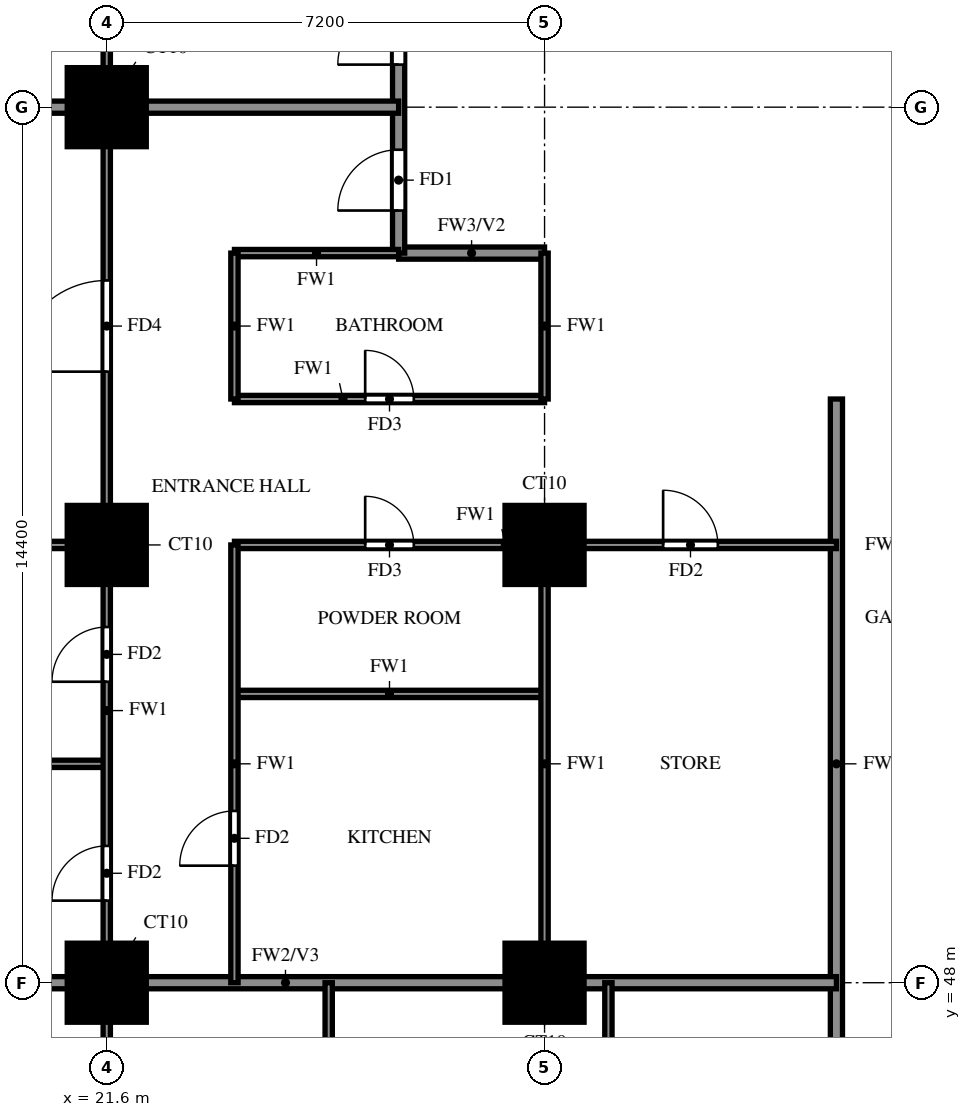
"""IFC4 building model, lengths in metres.
Left out: names, types, materials, properties, quantities, classifications, styles, units other than length and angle.
Written with IfcOpenShell. Run it as: python <this file> out.ifc"""

import sys

from ifc_helpers import new_model, si_unit, direction, frame, frame_2d, origin, origin_2d, place, context, subcontext, project, spatial, rectangle, extrude, source, transform, mapped, element, fill, save


model = new_model("IFC4")
c1 = context("Model", 3, precision=1e-05, world=origin(), true_north=direction((0.0, 1.0)))
c2 = subcontext(c1, "Body", "Model", "MODEL_VIEW")
j1 = project(units=[si_unit("LENGTHUNIT", "METRE"), si_unit("PLANEANGLEUNIT", "RADIAN")], contexts=[c1])
p1 = place(None, origin())
s1 = spatial("IfcSite", under=j1, at=p1, CompositionType="ELEMENT")
p2 = place(p1, origin())
s2 = spatial("IfcBuilding", under=s1, at=p2, CompositionType="ELEMENT")
p3 = place(p2, frame((0.0, 0.0, 69.0)))
s3 = spatial("IfcBuildingStorey", under=s2, at=p3, CompositionType="ELEMENT", Elevation=69.0)
m1 = source(origin(), c2, "Body", "SweptSolid", [
    extrude(rectangle(XDim=1.3, YDim=1.3, at=origin_2d()), origin(), (0.0, 0.0, 1.0), 3.18),
])
for number, where, z_axis, x_axis in (
    (1, (21.6, 48.0, 0.0), (0.0, 0.0, 1.0), (1.0, 0.0, 0.0)),
    (2, (28.8, 48.0, 0.0), (0.0, 0.0, 1.0), (1.0, 0.0, 0.0)),
    (3, (21.6, 55.2, 0.0), (0.0, 0.0, 1.0), (1.0, 0.0, 0.0)),
    (4, (28.8, 55.2, 0.0), (0.0, 0.0, 1.0), (1.0, 0.0, 0.0)),
    (5, (21.6, 62.4, 0.0), (0.0, 0.0, 1.0), (1.0, 0.0, 0.0)),
):
    element("IfcColumn", number, at=place(p3, frame(where, z_axis=z_axis, x_axis=x_axis)), inside=s3, PredefinedType="COLUMN", context=c2, shape_type="MappedRepresentation", body=[
        mapped(m1, transform((0.0, 0.0, 0.0))),
    ])
p4 = place(p3, frame((26.4, 60.0, 0.0), z_axis=(0.0, 0.0, 1.0), x_axis=(1.0, 0.0, 0.0)))
e6 = element("IfcWall", 6, at=p4, inside=s3, PredefinedType="SOLIDWALL", context=c2, shape_type="SweptSolid", body=[
    extrude(rectangle(XDim=2.4, YDim=0.2, at=frame_2d((1.2, 0.0))), origin(), (0.0, 0.0, 1.0), 3.18),
])
p5 = place(p3, frame((26.4, 60.0, 0.0), z_axis=(0.0, 0.0, 1.0), x_axis=(0.0, 1.0, 0.0)))
e7 = element("IfcWall", 7, at=p5, inside=s3, PredefinedType="SOLIDWALL", context=c2, shape_type="SweptSolid", body=[
    extrude(rectangle(XDim=9.6, YDim=0.2, at=frame_2d((4.8, 0.0))), origin(), (0.0, 0.0, 1.0), 3.18),
])
p6 = place(p5, frame((0.7, 0.0, 0.0)))
e8 = element("IfcOpeningElement", 8, at=p6, cuts=e7, PredefinedType="OPENING", context=c2, shape_type="SweptSolid", body=[
    extrude(rectangle(XDim=1.0, YDim=2.1, at=frame_2d((0.5, 1.05))), frame((0.0, 0.11, 0.0), z_axis=(0.0, -1.0, 0.0), x_axis=(1.0, 0.0, 0.0)), (0.0, 0.0, 1.0), 0.22),
])
p7 = place(p5, frame((3.1, 0.0, 0.0)))
e9 = element("IfcOpeningElement", 9, at=p7, cuts=e7, PredefinedType="OPENING", context=c2, shape_type="SweptSolid", body=[
    extrude(rectangle(XDim=1.0, YDim=2.1, at=frame_2d((0.5, 1.05))), frame((0.0, 0.11, 0.0), z_axis=(0.0, -1.0, 0.0), x_axis=(1.0, 0.0, 0.0)), (0.0, 0.0, 1.0), 0.22),
])
p8 = place(p3, frame((33.6, 45.6, 0.0), z_axis=(0.0, 0.0, 1.0), x_axis=(0.0, 1.0, 0.0)))
e10 = element("IfcWall", 10, at=p8, inside=s3, PredefinedType="SOLIDWALL", context=c2, shape_type="SweptSolid", body=[
    extrude(rectangle(XDim=12.0, YDim=0.2, at=frame_2d((6.0, 0.0))), origin(), (0.0, 0.0, 1.0), 3.18),
])
p9 = place(p3, frame((14.525, 48.0, 0.0), z_axis=(0.0, 0.0, 1.0), x_axis=(1.0, 0.0, 0.0)))
e11 = element("IfcWall", 11, at=p9, inside=s3, PredefinedType="SOLIDWALL", context=c2, shape_type="SweptSolid", body=[
    extrude(rectangle(XDim=19.075, YDim=0.2, at=frame_2d((9.538, 0.0))), origin(), (0.0, 0.0, 1.0), 3.18),
])
p10 = place(p3, frame((14.525, 62.4, 0.0), z_axis=(0.0, 0.0, 1.0), x_axis=(1.0, 0.0, 0.0)))
e12 = element("IfcWall", 12, at=p10, inside=s3, PredefinedType="SOLIDWALL", context=c2, shape_type="SweptSolid", body=[
    extrude(rectangle(XDim=11.875, YDim=0.2, at=frame_2d((5.938, 0.0))), origin(), (0.0, 0.0, 1.0), 3.18),
])
p11 = place(p3, frame((14.525, 51.6, 0.0), z_axis=(0.0, 0.0, 1.0), x_axis=(1.0, 0.0, 0.0)))
e13 = element("IfcWall", 13, at=p11, inside=s3, PredefinedType="PARTITIONING", context=c2, shape_type="SweptSolid", body=[
    extrude(rectangle(XDim=7.075, YDim=0.12, at=frame_2d((3.538, 0.0))), origin(), (0.0, 0.0, 1.0), 2.28),
])
p12 = place(p3, frame((23.7, 52.75, 0.0), z_axis=(0.0, 0.0, 1.0), x_axis=(1.0, 0.0, 0.0)))
e14 = element("IfcWall", 14, at=p12, inside=s3, PredefinedType="PARTITIONING", context=c2, shape_type="SweptSolid", body=[
    extrude(rectangle(XDim=5.1, YDim=0.12, at=frame_2d((2.55, 0.0))), origin(), (0.0, 0.0, 1.0), 3.18),
])
p13 = place(p3, frame((14.525, 55.2, 0.0), z_axis=(0.0, 0.0, 1.0), x_axis=(1.0, 0.0, 0.0)))
e15 = element("IfcWall", 15, at=p13, inside=s3, PredefinedType="PARTITIONING", context=c2, shape_type="SweptSolid", body=[
    extrude(rectangle(XDim=7.075, YDim=0.12, at=frame_2d((3.538, 0.0))), origin(), (0.0, 0.0, 1.0), 3.18),
])
p14 = place(p3, frame((23.7, 55.2, 0.0), z_axis=(0.0, 0.0, 1.0), x_axis=(1.0, 0.0, 0.0)))
e16 = element("IfcWall", 16, at=p14, inside=s3, PredefinedType="PARTITIONING", context=c2, shape_type="SweptSolid", body=[
    extrude(rectangle(XDim=9.9, YDim=0.12, at=frame_2d((4.95, 0.0))), origin(), (0.0, 0.0, 1.0), 3.18),
])
p15 = place(p14, frame((2.15, 0.0, 0.0)))
e17 = element("IfcOpeningElement", 17, at=p15, cuts=e16, PredefinedType="OPENING", context=c2, shape_type="SweptSolid", body=[
    extrude(rectangle(XDim=0.8, YDim=2.1, at=frame_2d((0.4, 1.05))), frame((0.0, 0.07, 0.0), z_axis=(0.0, -1.0, 0.0), x_axis=(1.0, 0.0, 0.0)), (0.0, 0.0, 1.0), 0.14),
])
p16 = place(p14, frame((7.05, 0.0, 0.0)))
e18 = element("IfcOpeningElement", 18, at=p16, cuts=e16, PredefinedType="OPENING", context=c2, shape_type="SweptSolid", body=[
    extrude(rectangle(XDim=0.9, YDim=2.1, at=frame_2d((0.45, 1.05))), frame((0.0, 0.07, 0.0), z_axis=(0.0, -1.0, 0.0), x_axis=(1.0, 0.0, 0.0)), (0.0, 0.0, 1.0), 0.14),
])
p17 = place(p3, frame((23.7, 57.6, 0.0), z_axis=(0.0, 0.0, 1.0), x_axis=(1.0, 0.0, 0.0)))
e19 = element("IfcWall", 19, at=p17, inside=s3, PredefinedType="PARTITIONING", context=c2, shape_type="SweptSolid", body=[
    extrude(rectangle(XDim=5.1, YDim=0.12, at=frame_2d((2.55, 0.0))), origin(), (0.0, 0.0, 1.0), 3.18),
])
p18 = place(p17, frame((2.15, 0.0, 0.0)))
e20 = element("IfcOpeningElement", 20, at=p18, cuts=e19, PredefinedType="OPENING", context=c2, shape_type="SweptSolid", body=[
    extrude(rectangle(XDim=0.8, YDim=2.1, at=frame_2d((0.4, 1.05))), frame((0.0, 0.07, 0.0), z_axis=(0.0, -1.0, 0.0), x_axis=(1.0, 0.0, 0.0)), (0.0, 0.0, 1.0), 0.14),
])
p19 = place(p3, frame((23.7, 60.0, 0.0), z_axis=(0.0, 0.0, 1.0), x_axis=(1.0, 0.0, 0.0)))
e21 = element("IfcWall", 21, at=p19, inside=s3, PredefinedType="PARTITIONING", context=c2, shape_type="SweptSolid", body=[
    extrude(rectangle(XDim=2.7, YDim=0.12, at=frame_2d((1.35, 0.0))), origin(), (0.0, 0.0, 1.0), 3.18),
])
p20 = place(p3, frame((21.6, 33.725, 0.0), z_axis=(0.0, 0.0, 1.0), x_axis=(0.0, 1.0, 0.0)))
e22 = element("IfcWall", 22, at=p20, inside=s3, PredefinedType="PARTITIONING", context=c2, shape_type="SweptSolid", body=[
    extrude(rectangle(XDim=39.475, YDim=0.12, at=frame_2d((19.737, 0.0))), origin(), (0.0, 0.0, 1.0), 3.18),
])
p21 = place(p20, frame((7.775, 0.0, 0.0)))
e23 = element("IfcOpeningElement", 23, at=p21, cuts=e22, PredefinedType="OPENING", context=c2, shape_type="SweptSolid", body=[
    extrude(rectangle(XDim=0.9, YDim=2.1, at=frame_2d((0.45, 1.05))), frame((0.0, 0.07, 0.0), z_axis=(0.0, -1.0, 0.0), x_axis=(1.0, 0.0, 0.0)), (0.0, 0.0, 1.0), 0.14),
])
p22 = place(p20, frame((15.625, 0.0, 0.0)))
e24 = element("IfcOpeningElement", 24, at=p22, cuts=e22, PredefinedType="OPENING", context=c2, shape_type="SweptSolid", body=[
    extrude(rectangle(XDim=0.9, YDim=2.1, at=frame_2d((0.45, 1.05))), frame((0.0, 0.07, 0.0), z_axis=(0.0, -1.0, 0.0), x_axis=(1.0, 0.0, 0.0)), (0.0, 0.0, 1.0), 0.14),
])
p23 = place(p20, frame((19.225, 0.0, 0.0)))
e25 = element("IfcOpeningElement", 25, at=p23, cuts=e22, PredefinedType="OPENING", context=c2, shape_type="SweptSolid", body=[
    extrude(rectangle(XDim=0.9, YDim=2.1, at=frame_2d((0.45, 1.05))), frame((0.0, 0.07, 0.0), z_axis=(0.0, -1.0, 0.0), x_axis=(1.0, 0.0, 0.0)), (0.0, 0.0, 1.0), 0.14),
])
p24 = place(p20, frame((24.325, 0.0, 0.0)))
e26 = element("IfcOpeningElement", 26, at=p24, cuts=e22, PredefinedType="OPENING", context=c2, shape_type="SweptSolid", body=[
    extrude(rectangle(XDim=1.5, YDim=2.1, at=frame_2d((0.75, 1.05))), frame((0.0, 0.07, 0.0), z_axis=(0.0, -1.0, 0.0), x_axis=(1.0, 0.0, 0.0)), (0.0, 0.0, 1.0), 0.14),
])
p25 = place(p20, frame((30.025, 0.0, 0.0)))
e27 = element("IfcOpeningElement", 27, at=p25, cuts=e22, PredefinedType="OPENING", context=c2, shape_type="SweptSolid", body=[
    extrude(rectangle(XDim=0.9, YDim=2.1, at=frame_2d((0.45, 1.05))), frame((0.0, 0.07, 0.0), z_axis=(0.0, -1.0, 0.0), x_axis=(1.0, 0.0, 0.0)), (0.0, 0.0, 1.0), 0.14),
])
p26 = place(p20, frame((33.625, 0.0, 0.0)))
e28 = element("IfcOpeningElement", 28, at=p26, cuts=e22, PredefinedType="OPENING", context=c2, shape_type="SweptSolid", body=[
    extrude(rectangle(XDim=0.9, YDim=2.1, at=frame_2d((0.45, 1.05))), frame((0.0, 0.07, 0.0), z_axis=(0.0, -1.0, 0.0), x_axis=(1.0, 0.0, 0.0)), (0.0, 0.0, 1.0), 0.14),
])
p27 = place(p20, frame((37.225, 0.0, 0.0)))
e29 = element("IfcOpeningElement", 29, at=p27, cuts=e22, PredefinedType="OPENING", context=c2, shape_type="SweptSolid", body=[
    extrude(rectangle(XDim=0.9, YDim=2.1, at=frame_2d((0.45, 1.05))), frame((0.0, 0.07, 0.0), z_axis=(0.0, -1.0, 0.0), x_axis=(1.0, 0.0, 0.0)), (0.0, 0.0, 1.0), 0.14),
])
p28 = place(p3, frame((23.7, 48.0, 0.0), z_axis=(0.0, 0.0, 1.0), x_axis=(0.0, 1.0, 0.0)))
e30 = element("IfcWall", 30, at=p28, inside=s3, PredefinedType="PARTITIONING", context=c2, shape_type="SweptSolid", body=[
    extrude(rectangle(XDim=7.2, YDim=0.12, at=frame_2d((3.6, 0.0))), origin(), (0.0, 0.0, 1.0), 3.18),
])
p29 = place(p28, frame((1.925, 0.0, 0.0)))
e31 = element("IfcOpeningElement", 31, at=p29, cuts=e30, PredefinedType="OPENING", context=c2, shape_type="SweptSolid", body=[
    extrude(rectangle(XDim=0.9, YDim=2.1, at=frame_2d((0.45, 1.05))), frame((0.0, 0.07, 0.0), z_axis=(0.0, -1.0, 0.0), x_axis=(1.0, 0.0, 0.0)), (0.0, 0.0, 1.0), 0.14),
])
p30 = place(p3, frame((23.7, 57.6, 0.0), z_axis=(0.0, 0.0, 1.0), x_axis=(0.0, 1.0, 0.0)))
e32 = element("IfcWall", 32, at=p30, inside=s3, PredefinedType="PARTITIONING", context=c2, shape_type="SweptSolid", body=[
    extrude(rectangle(XDim=2.4, YDim=0.12, at=frame_2d((1.2, 0.0))), origin(), (0.0, 0.0, 1.0), 3.18),
])
p31 = place(p3, frame((25.25, 42.9, 0.0), z_axis=(0.0, 0.0, 1.0), x_axis=(0.0, 1.0, 0.0)))
e33 = element("IfcWall", 33, at=p31, inside=s3, PredefinedType="PARTITIONING", context=c2, shape_type="SweptSolid", body=[
    extrude(rectangle(XDim=5.1, YDim=0.12, at=frame_2d((2.55, 0.0))), origin(), (0.0, 0.0, 1.0), 3.18),
])
p32 = place(p3, frame((28.8, 48.0, 0.0), z_axis=(0.0, 0.0, 1.0), x_axis=(0.0, 1.0, 0.0)))
e34 = element("IfcWall", 34, at=p32, inside=s3, PredefinedType="PARTITIONING", context=c2, shape_type="SweptSolid", body=[
    extrude(rectangle(XDim=7.2, YDim=0.12, at=frame_2d((3.6, 0.0))), origin(), (0.0, 0.0, 1.0), 3.18),
])
p33 = place(p3, frame((28.8, 57.6, 0.0), z_axis=(0.0, 0.0, 1.0), x_axis=(0.0, 1.0, 0.0)))
e35 = element("IfcWall", 35, at=p33, inside=s3, PredefinedType="PARTITIONING", context=c2, shape_type="SweptSolid", body=[
    extrude(rectangle(XDim=2.4, YDim=0.12, at=frame_2d((1.2, 0.0))), origin(), (0.0, 0.0, 1.0), 3.18),
])
p34 = place(p3, frame((29.85, 42.9, 0.0), z_axis=(0.0, 0.0, 1.0), x_axis=(0.0, 1.0, 0.0)))
e36 = element("IfcWall", 36, at=p34, inside=s3, PredefinedType="PARTITIONING", context=c2, shape_type="SweptSolid", body=[
    extrude(rectangle(XDim=5.1, YDim=0.12, at=frame_2d((2.55, 0.0))), origin(), (0.0, 0.0, 1.0), 3.18),
])
p35 = place(p6, origin())
e37 = element("IfcDoor", 37, at=p35, inside=s3, OperationType="SINGLE_SWING_LEFT", PredefinedType="DOOR", context=c2, shape_type="SweptSolid", body=[
    extrude(rectangle(XDim=1.0, YDim=2.1, at=frame_2d((0.5, 1.05))), frame((0.0, 0.025, 0.0), z_axis=(0.0, -1.0, 0.0), x_axis=(1.0, 0.0, 0.0)), (0.0, 0.0, 1.0), 0.05),
])
fill(e8, e37)
p36 = place(p22, origin())
e38 = element("IfcDoor", 38, at=p36, inside=s3, OperationType="SINGLE_SWING_LEFT", PredefinedType="DOOR", context=c2, shape_type="SweptSolid", body=[
    extrude(rectangle(XDim=0.9, YDim=2.1, at=frame_2d((0.45, 1.05))), frame((0.0, 0.025, 0.0), z_axis=(0.0, -1.0, 0.0), x_axis=(1.0, 0.0, 0.0)), (0.0, 0.0, 1.0), 0.05),
])
fill(e24, e38)
p37 = place(p23, origin())
e39 = element("IfcDoor", 39, at=p37, inside=s3, OperationType="SINGLE_SWING_RIGHT", PredefinedType="DOOR", context=c2, shape_type="SweptSolid", body=[
    extrude(rectangle(XDim=0.9, YDim=2.1, at=frame_2d((0.45, 1.05))), frame((0.0, 0.025, 0.0), z_axis=(0.0, -1.0, 0.0), x_axis=(1.0, 0.0, 0.0)), (0.0, 0.0, 1.0), 0.05),
])
fill(e25, e39)
p38 = place(p24, origin())
e40 = element("IfcDoor", 40, at=p38, inside=s3, OperationType="SINGLE_SWING_LEFT", PredefinedType="DOOR", context=c2, shape_type="SweptSolid", body=[
    extrude(rectangle(XDim=1.5, YDim=2.1, at=frame_2d((0.75, 1.05))), frame((0.0, 0.025, 0.0), z_axis=(0.0, -1.0, 0.0), x_axis=(1.0, 0.0, 0.0)), (0.0, 0.0, 1.0), 0.05),
])
fill(e26, e40)
p39 = place(p29, origin())
e41 = element("IfcDoor", 41, at=p39, inside=s3, OperationType="SINGLE_SWING_LEFT", PredefinedType="DOOR", context=c2, shape_type="SweptSolid", body=[
    extrude(rectangle(XDim=0.9, YDim=2.1, at=frame_2d((0.45, 1.05))), frame((0.0, 0.025, 0.0), z_axis=(0.0, -1.0, 0.0), x_axis=(1.0, 0.0, 0.0)), (0.0, 0.0, 1.0), 0.05),
])
fill(e31, e41)
p40 = place(p15, origin())
e42 = element("IfcDoor", 42, at=p40, inside=s3, OperationType="SINGLE_SWING_RIGHT", PredefinedType="DOOR", context=c2, shape_type="SweptSolid", body=[
    extrude(rectangle(XDim=0.8, YDim=2.1, at=frame_2d((0.4, 1.05))), frame((0.0, 0.025, 0.0), z_axis=(0.0, -1.0, 0.0), x_axis=(1.0, 0.0, 0.0)), (0.0, 0.0, 1.0), 0.05),
])
fill(e17, e42)
p41 = place(p18, origin())
e43 = element("IfcDoor", 43, at=p41, inside=s3, OperationType="SINGLE_SWING_LEFT", PredefinedType="DOOR", context=c2, shape_type="SweptSolid", body=[
    extrude(rectangle(XDim=0.8, YDim=2.1, at=frame_2d((0.4, 1.05))), frame((0.0, 0.025, 0.0), z_axis=(0.0, -1.0, 0.0), x_axis=(1.0, 0.0, 0.0)), (0.0, 0.0, 1.0), 0.05),
])
fill(e20, e43)
p42 = place(p16, origin())
e44 = element("IfcDoor", 44, at=p42, inside=s3, OperationType="SINGLE_SWING_LEFT", PredefinedType="DOOR", context=c2, shape_type="SweptSolid", body=[
    extrude(rectangle(XDim=0.9, YDim=2.1, at=frame_2d((0.45, 1.05))), frame((0.0, 0.025, 0.0), z_axis=(0.0, -1.0, 0.0), x_axis=(1.0, 0.0, 0.0)), (0.0, 0.0, 1.0), 0.05),
])
fill(e18, e44)
p43 = place(p7, origin())
e45 = element("IfcDoor", 45, at=p43, inside=s3, OperationType="SINGLE_SWING_LEFT", PredefinedType="DOOR", context=c2, shape_type="SweptSolid", body=[
    extrude(rectangle(XDim=1.0, YDim=2.1, at=frame_2d((0.5, 1.05))), frame((0.0, 0.025, 0.0), z_axis=(0.0, -1.0, 0.0), x_axis=(1.0, 0.0, 0.0)), (0.0, 0.0, 1.0), 0.05),
])
fill(e9, e45)
save(model, sys.argv[1])
